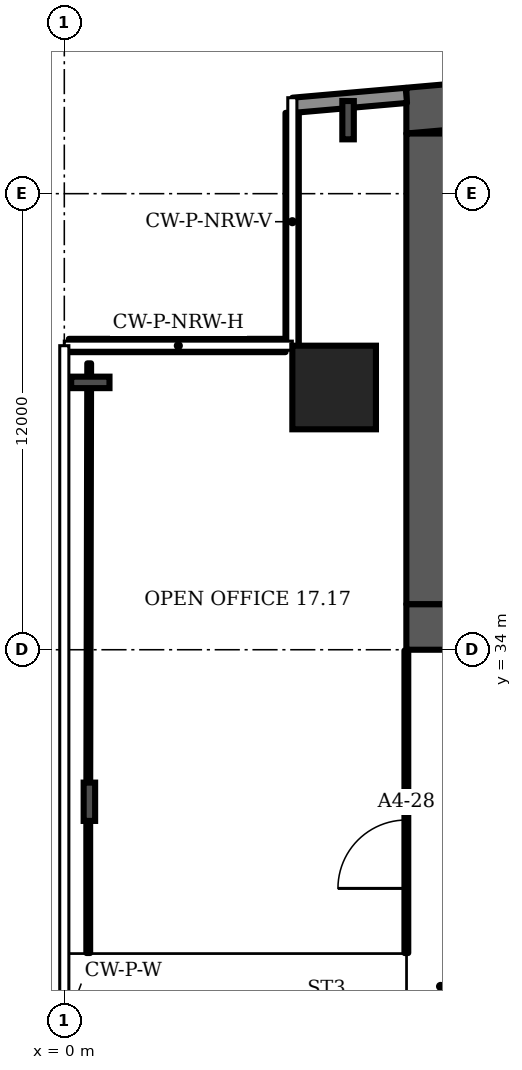
"""IFC4 building model, lengths in metres.
Left out: names, types, materials, properties, quantities, classifications, styles, units other than length and angle.
Written with IfcOpenShell. Run it as: python <this file> out.ifc"""

import sys

from ifc_helpers import new_model, si_unit, direction, frame, frame_2d, origin, origin_2d, place, context, subcontext, project, spatial, polyline, rectangle, i_section, outline, extrude, element, fill, save


model = new_model("IFC4")
c1 = context("Model", 3, precision=1e-05, world=origin(), true_north=direction((0.0, 1.0)))
c2 = subcontext(c1, "Body", "Model", "MODEL_VIEW")
j1 = project(units=[si_unit("LENGTHUNIT", "METRE"), si_unit("PLANEANGLEUNIT", "RADIAN")], contexts=[c1])
p1 = place(None, origin())
s1 = spatial("IfcSite", under=j1, at=p1, CompositionType="ELEMENT")
p2 = place(p1, origin())
s2 = spatial("IfcBuilding", under=s1, at=p2, CompositionType="ELEMENT")
p3 = place(p2, frame((0.0, 0.0, 81.1)))
s3 = spatial("IfcBuildingStorey", under=s2, at=p3, CompositionType="ELEMENT", Elevation=81.1)
p4 = place(p3, frame((0.0, 0.0, -0.0)))
e1 = element("IfcWall", 1, at=p4, inside=s3, PredefinedType="SHEAR", context=c2, shape_type="SweptSolid", body=[
    extrude(outline(polyline([(9.0, 47.583), (37.0, 50.032), (65.0, 47.583), (65.0, 48.787), (37.0, 51.237), (9.0, 48.787), (9.0, 47.583)])), origin(), (0.0, 0.0, 1.0), 3.6),
])
p5 = place(p3, frame((9.0, 34.6, 0.0), z_axis=(0.0, 0.0, 1.0), x_axis=(1.0, 0.0, 0.0)))
e2 = element("IfcWall", 2, at=p5, inside=s3, PredefinedType="SHEAR", context=c2, shape_type="SweptSolid", body=[
    extrude(rectangle(XDim=56.0, YDim=1.2, at=frame_2d((28.0, 0.0))), origin(), (0.0, 0.0, 1.0), 3.6),
])
p6 = place(p5, frame((2.0, 0.0, 0.0)))
e3 = element("IfcOpeningElement", 3, at=p6, cuts=e2, PredefinedType="OPENING", context=c2, shape_type="SweptSolid", body=[
    extrude(rectangle(XDim=1.0, YDim=2.1, at=frame_2d((0.5, 1.05))), frame((0.0, 0.61, 0.0), z_axis=(0.0, -1.0, 0.0), x_axis=(1.0, 0.0, 0.0)), (0.0, 0.0, 1.0), 1.22),
])
p7 = place(p5, frame((4.6, 0.0, 0.0)))
e4 = element("IfcOpeningElement", 4, at=p7, cuts=e2, PredefinedType="OPENING", context=c2, shape_type="SweptSolid", body=[
    extrude(rectangle(XDim=1.0, YDim=2.1, at=frame_2d((0.5, 1.05))), frame((0.0, 0.61, 0.0), z_axis=(0.0, -1.0, 0.0), x_axis=(1.0, 0.0, 0.0)), (0.0, 0.0, 1.0), 1.22),
])
p8 = place(p5, frame((7.867, 0.0, 0.0)))
e5 = element("IfcOpeningElement", 5, at=p8, cuts=e2, PredefinedType="OPENING", context=c2, shape_type="SweptSolid", body=[
    extrude(rectangle(XDim=1.1, YDim=2.1, at=frame_2d((0.55, 1.05))), frame((0.0, 0.61, 0.0), z_axis=(0.0, -1.0, 0.0), x_axis=(1.0, 0.0, 0.0)), (0.0, 0.0, 1.0), 1.22),
])
p9 = place(p5, frame((12.033, 0.0, 0.0)))
e6 = element("IfcOpeningElement", 6, at=p9, cuts=e2, PredefinedType="OPENING", context=c2, shape_type="SweptSolid", body=[
    extrude(rectangle(XDim=1.1, YDim=2.1, at=frame_2d((0.55, 1.05))), frame((0.0, 0.61, 0.0), z_axis=(0.0, -1.0, 0.0), x_axis=(1.0, 0.0, 0.0)), (0.0, 0.0, 1.0), 1.22),
])
p10 = place(p5, frame((9.8, 0.0, 0.0)))
e7 = element("IfcOpeningElement", 7, at=p10, cuts=e2, PredefinedType="OPENING", context=c2, shape_type="SweptSolid", body=[
    extrude(rectangle(XDim=1.4, YDim=2.1, at=frame_2d((0.7, 1.05))), frame((0.0, 0.61, 0.0), z_axis=(0.0, -1.0, 0.0), x_axis=(1.0, 0.0, 0.0)), (0.0, 0.0, 1.0), 1.22),
])
p11 = place(p5, frame((14.65, 0.0, 0.0)))
e8 = element("IfcOpeningElement", 8, at=p11, cuts=e2, PredefinedType="OPENING", context=c2, shape_type="SweptSolid", body=[
    extrude(rectangle(XDim=1.2, YDim=2.1, at=frame_2d((0.6, 1.05))), frame((0.0, 0.61, 0.0), z_axis=(0.0, -1.0, 0.0), x_axis=(1.0, 0.0, 0.0)), (0.0, 0.0, 1.0), 1.22),
])
p12 = place(p5, frame((21.867, 0.0, 0.0)))
e9 = element("IfcOpeningElement", 9, at=p12, cuts=e2, PredefinedType="OPENING", context=c2, shape_type="SweptSolid", body=[
    extrude(rectangle(XDim=1.1, YDim=2.1, at=frame_2d((0.55, 1.05))), frame((0.0, 0.61, 0.0), z_axis=(0.0, -1.0, 0.0), x_axis=(1.0, 0.0, 0.0)), (0.0, 0.0, 1.0), 1.22),
])
p13 = place(p5, frame((26.033, 0.0, 0.0)))
e10 = element("IfcOpeningElement", 10, at=p13, cuts=e2, PredefinedType="OPENING", context=c2, shape_type="SweptSolid", body=[
    extrude(rectangle(XDim=1.1, YDim=2.1, at=frame_2d((0.55, 1.05))), frame((0.0, 0.61, 0.0), z_axis=(0.0, -1.0, 0.0), x_axis=(1.0, 0.0, 0.0)), (0.0, 0.0, 1.0), 1.22),
])
p14 = place(p5, frame((23.8, 0.0, 0.0)))
e11 = element("IfcOpeningElement", 11, at=p14, cuts=e2, PredefinedType="OPENING", context=c2, shape_type="SweptSolid", body=[
    extrude(rectangle(XDim=1.4, YDim=2.1, at=frame_2d((0.7, 1.05))), frame((0.0, 0.61, 0.0), z_axis=(0.0, -1.0, 0.0), x_axis=(1.0, 0.0, 0.0)), (0.0, 0.0, 1.0), 1.22),
])
p15 = place(p5, frame((28.867, 0.0, 0.0)))
e12 = element("IfcOpeningElement", 12, at=p15, cuts=e2, PredefinedType="OPENING", context=c2, shape_type="SweptSolid", body=[
    extrude(rectangle(XDim=1.1, YDim=2.1, at=frame_2d((0.55, 1.05))), frame((0.0, 0.61, 0.0), z_axis=(0.0, -1.0, 0.0), x_axis=(1.0, 0.0, 0.0)), (0.0, 0.0, 1.0), 1.22),
])
p16 = place(p5, frame((33.033, 0.0, 0.0)))
e13 = element("IfcOpeningElement", 13, at=p16, cuts=e2, PredefinedType="OPENING", context=c2, shape_type="SweptSolid", body=[
    extrude(rectangle(XDim=1.1, YDim=2.1, at=frame_2d((0.55, 1.05))), frame((0.0, 0.61, 0.0), z_axis=(0.0, -1.0, 0.0), x_axis=(1.0, 0.0, 0.0)), (0.0, 0.0, 1.0), 1.22),
])
p17 = place(p5, frame((40.15, 0.0, 0.0)))
e14 = element("IfcOpeningElement", 14, at=p17, cuts=e2, PredefinedType="OPENING", context=c2, shape_type="SweptSolid", body=[
    extrude(rectangle(XDim=1.2, YDim=2.1, at=frame_2d((0.6, 1.05))), frame((0.0, 0.61, 0.0), z_axis=(0.0, -1.0, 0.0), x_axis=(1.0, 0.0, 0.0)), (0.0, 0.0, 1.0), 1.22),
])
p18 = place(p5, frame((44.8, 0.0, 0.0)))
e15 = element("IfcOpeningElement", 15, at=p18, cuts=e2, PredefinedType="OPENING", context=c2, shape_type="SweptSolid", body=[
    extrude(rectangle(XDim=1.4, YDim=2.1, at=frame_2d((0.7, 1.05))), frame((0.0, 0.61, 0.0), z_axis=(0.0, -1.0, 0.0), x_axis=(1.0, 0.0, 0.0)), (0.0, 0.0, 1.0), 1.22),
])
p19 = place(p5, frame((49.867, 0.0, 0.0)))
e16 = element("IfcOpeningElement", 16, at=p19, cuts=e2, PredefinedType="OPENING", context=c2, shape_type="SweptSolid", body=[
    extrude(rectangle(XDim=1.1, YDim=2.1, at=frame_2d((0.55, 1.05))), frame((0.0, 0.61, 0.0), z_axis=(0.0, -1.0, 0.0), x_axis=(1.0, 0.0, 0.0)), (0.0, 0.0, 1.0), 1.22),
])
p20 = place(p5, frame((53.5, 0.0, 0.0)))
e17 = element("IfcOpeningElement", 17, at=p20, cuts=e2, PredefinedType="OPENING", context=c2, shape_type="SweptSolid", body=[
    extrude(rectangle(XDim=1.1, YDim=2.1, at=frame_2d((0.55, 1.05))), frame((0.0, 0.61, 0.0), z_axis=(0.0, -1.0, 0.0), x_axis=(1.0, 0.0, 0.0)), (0.0, 0.0, 1.0), 1.22),
])
p21 = place(p5, frame((51.567, 0.0, 0.0)))
e18 = element("IfcOpeningElement", 18, at=p21, cuts=e2, PredefinedType="OPENING", context=c2, shape_type="SweptSolid", body=[
    extrude(rectangle(XDim=1.4, YDim=2.1, at=frame_2d((0.7, 1.05))), frame((0.0, 0.61, 0.0), z_axis=(0.0, -1.0, 0.0), x_axis=(1.0, 0.0, 0.0)), (0.0, 0.0, 1.0), 1.22),
])
p22 = place(p3, frame((9.6, 35.2, 0.0), z_axis=(0.0, 0.0, 1.0), x_axis=(0.0, 1.0, 0.0)))
e19 = element("IfcWall", 19, at=p22, inside=s3, PredefinedType="SHEAR", context=c2, shape_type="SweptSolid", body=[
    extrude(rectangle(XDim=12.383, YDim=1.2, at=frame_2d((6.191, 0.0))), origin(), (0.0, 0.0, 1.0), 3.6),
])
p23 = place(p3, frame((7.1, 40.9, 0.0), z_axis=(0.0, 0.0, 1.0), x_axis=(1.0, 0.0, 0.0)))
e20 = element("IfcColumn", 20, at=p23, inside=s3, PredefinedType="COLUMN", context=c2, shape_type="SweptSolid", body=[
    extrude(rectangle(XDim=2.2, YDim=2.2, at=origin_2d()), origin(), (0.0, 0.0, 1.0), 3.6),
])
for number, where, z_axis, x_axis in (
    (21, (7.467, 47.934, 0.0), (0.0, 0.0, 1.0), (-1.0, 0.0, 0.0)),
    (22, (0.685, 41.034, 0.0), (0.0, 0.0, 1.0), (0.0, 1.0, 0.0)),
    (23, (0.66, 30.0, 0.0), (0.0, 0.0, 1.0), (-1.0, 0.0, 0.0)),
):
    element("IfcColumn", number, at=place(p3, frame(where, z_axis=z_axis, x_axis=x_axis)), inside=s3, PredefinedType="COLUMN", context=c2, shape_type="SweptSolid", body=[
        extrude(i_section(OverallWidth=0.302, OverallDepth=1.008, WebThickness=0.021, FlangeThickness=0.04, FilletRadius=0.03, at=origin_2d()), origin(), (0.0, 0.0, 1.0), 3.6),
    ])
p24 = place(p3, frame((9.0, 48.587, 0.0), z_axis=(0.0, 0.0, 1.0), x_axis=(-0.996194, -0.087168, 0.0)))
e24 = element("IfcWall", 24, at=p24, inside=s3, PredefinedType="SOLIDWALL", context=c2, shape_type="SweptSolid", body=[
    extrude(rectangle(XDim=2.994, YDim=0.4, at=frame_2d((1.497, 0.0))), origin(), (0.0, 0.0, 1.0), 3.2),
])
p25 = place(p3, frame((5.995, 48.126, 0.0), z_axis=(0.0, 0.0, 1.0), x_axis=(0.0, -1.0, 0.0)))
e25 = element("IfcWall", 25, at=p25, inside=s3, PredefinedType="SOLIDWALL", context=c2, shape_type="SweptSolid", body=[
    extrude(rectangle(XDim=6.126, YDim=0.35, at=frame_2d((3.063, 0.0))), origin(), (0.0, 0.0, 1.0), 1.0),
])
p26 = place(p3, frame((5.82, 42.005, 0.0), z_axis=(0.0, 0.0, 1.0), x_axis=(-1.0, 0.0, 0.0)))
e26 = element("IfcWall", 26, at=p26, inside=s3, PredefinedType="SOLIDWALL", context=c2, shape_type="SweptSolid", body=[
    extrude(rectangle(XDim=5.7, YDim=0.35, at=frame_2d((2.85, 0.0))), origin(), (0.0, 0.0, 1.0), 1.0),
])
p27 = place(p3, frame((0.63, 26.02, 0.0), z_axis=(0.0, 0.0, 1.0), x_axis=(0.0, 1.0, 0.0)))
e27 = element("IfcWall", 27, at=p27, inside=s3, PredefinedType="PARTITIONING", context=c2, shape_type="SweptSolid", body=[
    extrude(rectangle(XDim=3.98, YDim=0.1, at=frame_2d((1.99, 0.0))), origin(), (0.0, 0.0, 1.0), 2.58),
])
p28 = place(p3, frame((0.63, 30.0, 0.0), z_axis=(0.0, 0.0, 1.0), x_axis=(0.00218, 0.999994, 0.0)))
e28 = element("IfcWall", 28, at=p28, inside=s3, PredefinedType="PARTITIONING", context=c2, shape_type="SweptSolid", body=[
    extrude(rectangle(XDim=11.535, YDim=0.1, at=frame_2d((5.768, 0.0))), origin(), (0.0, 0.0, 1.0), 2.58),
])
p29 = place(p3, frame((9.0, 26.02, 0.0), z_axis=(0.0, 0.0, 1.0), x_axis=(0.0, 1.0, 0.0)))
e29 = element("IfcWall", 29, at=p29, inside=s3, PredefinedType="PARTITIONING", context=c2, shape_type="SweptSolid", body=[
    extrude(rectangle(XDim=7.96, YDim=0.1, at=frame_2d((3.98, 0.0))), origin(), (0.0, 0.0, 1.0), 3.2),
])
p30 = place(p29, frame((1.7, 0.0, 0.0)))
e30 = element("IfcOpeningElement", 30, at=p30, cuts=e29, PredefinedType="OPENING", context=c2, shape_type="SweptSolid", body=[
    extrude(rectangle(XDim=1.8, YDim=2.1, at=frame_2d((0.9, 1.05))), frame((0.0, 0.06, 0.0), z_axis=(0.0, -1.0, 0.0), x_axis=(1.0, 0.0, 0.0)), (0.0, 0.0, 1.0), 0.12),
])
p31 = place(p30, origin())
e31 = element("IfcDoor", 31, at=p31, inside=s3, OperationType="DOUBLE_DOOR_SINGLE_SWING", PredefinedType="DOOR", context=c2, shape_type="SweptSolid", body=[
    extrude(rectangle(XDim=1.8, YDim=2.1, at=frame_2d((0.9, 1.05))), frame((0.0, 0.025, 0.0), z_axis=(0.0, -1.0, 0.0), x_axis=(1.0, 0.0, 0.0)), (0.0, 0.0, 1.0), 0.05),
])
fill(e30, e31)
save(model, sys.argv[1])
